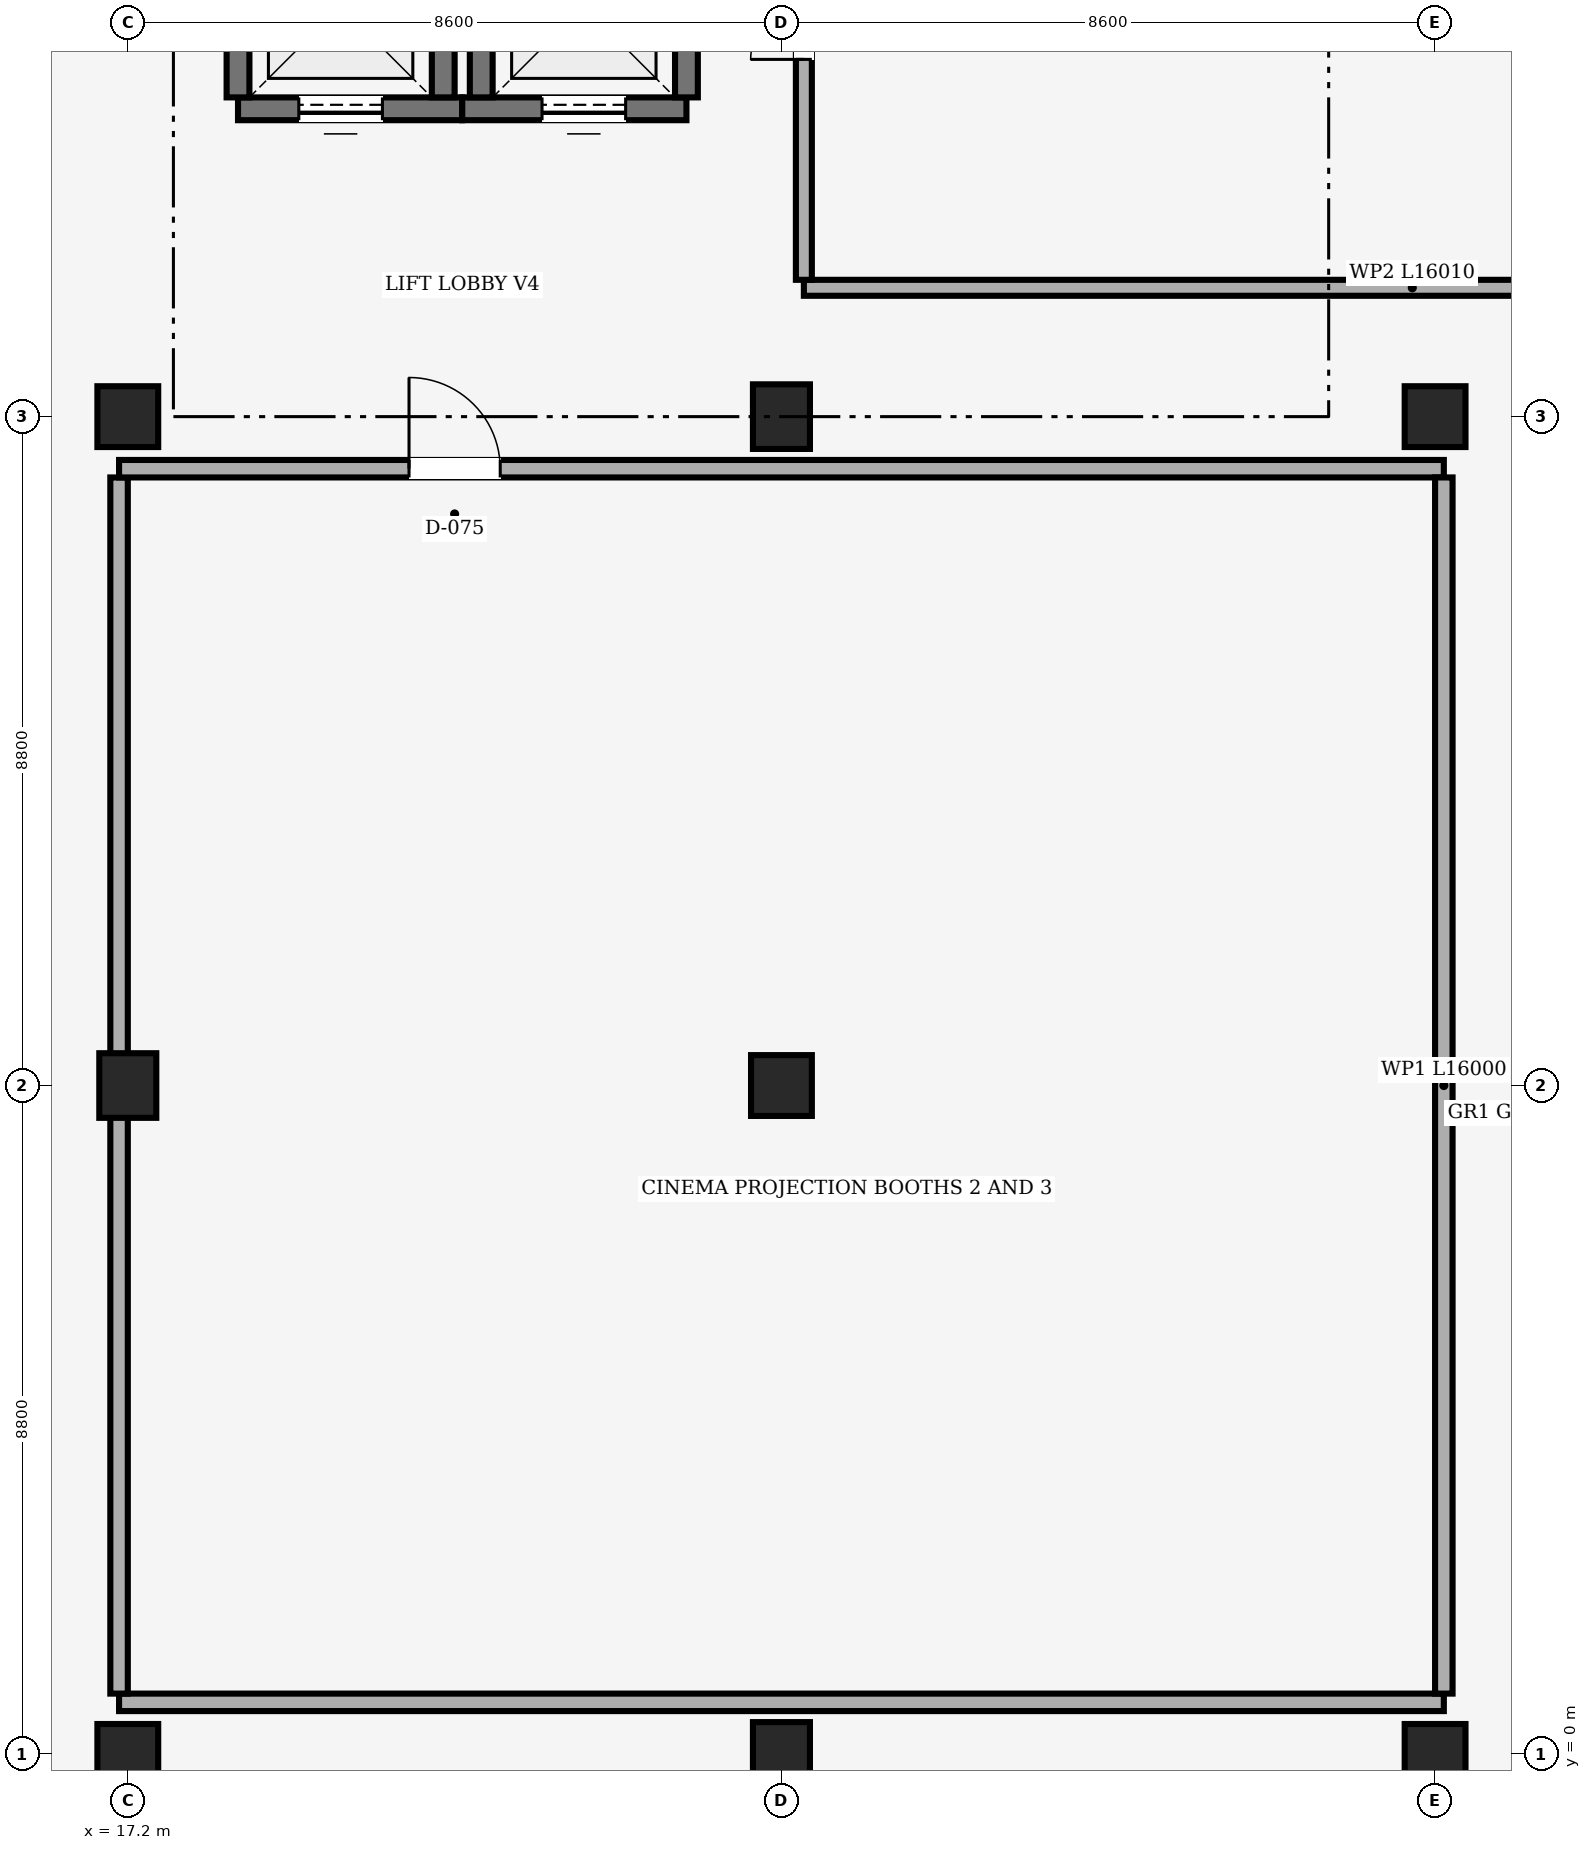
"""IFC4 building model, lengths in metres.
Left out: names, types, materials, properties, quantities, classifications, styles, units other than length and angle.
Written with IfcOpenShell. Run it as: python <this file> out.ifc"""

import sys

from ifc_helpers import new_model, si_unit, direction, frame, frame_2d, origin, origin_2d, place, context, subcontext, project, spatial, rectangle, extrude, element, fill, save


model = new_model("IFC4")
c1 = context("Model", 3, precision=1e-05, world=origin(), true_north=direction((0.0, 1.0)))
c2 = subcontext(c1, "Body", "Model", "MODEL_VIEW")
j1 = project(units=[si_unit("LENGTHUNIT", "METRE"), si_unit("PLANEANGLEUNIT", "RADIAN")], contexts=[c1])
p1 = place(None, origin())
s1 = spatial("IfcSite", under=j1, at=p1, CompositionType="ELEMENT")
p2 = place(p1, origin())
s2 = spatial("IfcBuilding", under=s1, at=p2, CompositionType="ELEMENT")
p3 = place(p2, frame((0.0, 0.0, 8.4)))
s3 = spatial("IfcBuildingStorey", under=s2, at=p3, CompositionType="ELEMENT", Elevation=8.4)
p4 = place(p3, frame((17.2, 0.0, 0.0), z_axis=(0.0, 0.0, 1.0), x_axis=(1.0, 0.0, 0.0)))
e1 = element("IfcColumn", 1, at=p4, inside=s3, PredefinedType="COLUMN", context=c2, shape_type="SweptSolid", body=[
    extrude(rectangle(XDim=0.8, YDim=0.8, at=origin_2d()), origin(), (0.0, 0.0, 1.0), 3.34),
])
p5 = place(p3, frame((17.2, 8.8, 0.0), z_axis=(0.0, 0.0, 1.0), x_axis=(1.0, 0.0, 0.0)))
e2 = element("IfcColumn", 2, at=p5, inside=s3, PredefinedType="COLUMN", context=c2, shape_type="SweptSolid", body=[
    extrude(rectangle(XDim=0.75, YDim=0.85, at=origin_2d()), origin(), (0.0, 0.0, 1.0), 3.34),
])
p6 = place(p3, frame((17.2, 17.6, 0.0), z_axis=(0.0, 0.0, 1.0), x_axis=(1.0, 0.0, 0.0)))
e3 = element("IfcColumn", 3, at=p6, inside=s3, PredefinedType="COLUMN", context=c2, shape_type="SweptSolid", body=[
    extrude(rectangle(XDim=0.8, YDim=0.8, at=origin_2d()), origin(), (0.0, 0.0, 1.0), 3.34),
])
p7 = place(p3, frame((25.8, 0.0, 0.0), z_axis=(0.0, 0.0, 1.0), x_axis=(1.0, 0.0, 0.0)))
e4 = element("IfcColumn", 4, at=p7, inside=s3, PredefinedType="COLUMN", context=c2, shape_type="SweptSolid", body=[
    extrude(rectangle(XDim=0.75, YDim=0.85, at=origin_2d()), origin(), (0.0, 0.0, 1.0), 3.34),
])
p8 = place(p3, frame((25.8, 8.8, 0.0), z_axis=(0.0, 0.0, 1.0), x_axis=(1.0, 0.0, 0.0)))
e5 = element("IfcColumn", 5, at=p8, inside=s3, PredefinedType="COLUMN", context=c2, shape_type="SweptSolid", body=[
    extrude(rectangle(XDim=0.8, YDim=0.8, at=origin_2d()), origin(), (0.0, 0.0, 1.0), 3.34),
])
p9 = place(p3, frame((25.8, 17.6, 0.0), z_axis=(0.0, 0.0, 1.0), x_axis=(1.0, 0.0, 0.0)))
e6 = element("IfcColumn", 6, at=p9, inside=s3, PredefinedType="COLUMN", context=c2, shape_type="SweptSolid", body=[
    extrude(rectangle(XDim=0.75, YDim=0.85, at=origin_2d()), origin(), (0.0, 0.0, 1.0), 3.34),
])
for number, where, z_axis, x_axis in (
    (7, (34.4, 0.0, 0.0), (0.0, 0.0, 1.0), (1.0, 0.0, 0.0)),
    (8, (34.4, 17.6, 0.0), (0.0, 0.0, 1.0), (1.0, 0.0, 0.0)),
):
    element("IfcColumn", number, at=place(p3, frame(where, z_axis=z_axis, x_axis=x_axis)), inside=s3, PredefinedType="COLUMN", context=c2, shape_type="SweptSolid", body=[
        extrude(rectangle(XDim=0.8, YDim=0.8, at=origin_2d()), origin(), (0.0, 0.0, 1.0), 3.34),
    ])
p10 = place(p3, frame((21.6, 21.65, 0.0), z_axis=(0.0, 0.0, 1.0), x_axis=(-1.0, 0.0, 0.0)))
e9 = element("IfcWall", 9, at=p10, inside=s3, PredefinedType="SHEAR", context=c2, shape_type="SweptSolid", body=[
    extrude(rectangle(XDim=2.95, YDim=0.3, at=frame_2d((1.475, 0.0))), origin(), (0.0, 0.0, 1.0), 3.34),
])
p11 = place(p10, frame((1.05, 0.0, 0.0)))
e10 = element("IfcOpeningElement", 10, at=p11, cuts=e9, PredefinedType="OPENING", context=c2, shape_type="SweptSolid", body=[
    extrude(rectangle(XDim=1.1, YDim=2.1, at=frame_2d((0.55, 1.05))), frame((0.0, 0.15, 0.0), z_axis=(0.0, -1.0, 0.0), x_axis=(1.0, 0.0, 0.0)), (0.0, 0.0, 1.0), 0.3),
])
for number, where, z_axis, x_axis in (
    (11, (18.65, 21.8, 0.0), (0.0, 0.0, 1.0), (0.0, 1.0, 0.0)),
    (12, (21.35, 24.2, 0.0), (0.0, 0.0, 1.0), (0.0, -1.0, 0.0)),
):
    element("IfcWall", number, at=place(p3, frame(where, z_axis=z_axis, x_axis=x_axis)), inside=s3, PredefinedType="SHEAR", context=c2, shape_type="SweptSolid", body=[
        extrude(rectangle(XDim=2.4, YDim=0.3, at=frame_2d((1.2, 0.0))), origin(), (0.0, 0.0, 1.0), 3.34),
    ])
p12 = place(p3, frame((24.55, 21.65, 0.0), z_axis=(0.0, 0.0, 1.0), x_axis=(-1.0, 0.0, 0.0)))
e13 = element("IfcWall", 13, at=p12, inside=s3, PredefinedType="SHEAR", context=c2, shape_type="SweptSolid", body=[
    extrude(rectangle(XDim=2.95, YDim=0.3, at=frame_2d((1.475, 0.0))), origin(), (0.0, 0.0, 1.0), 3.34),
])
p13 = place(p12, frame((0.8, 0.0, 0.0)))
e14 = element("IfcOpeningElement", 14, at=p13, cuts=e13, PredefinedType="OPENING", context=c2, shape_type="SweptSolid", body=[
    extrude(rectangle(XDim=1.1, YDim=2.1, at=frame_2d((0.55, 1.05))), frame((0.0, 0.15, 0.0), z_axis=(0.0, -1.0, 0.0), x_axis=(1.0, 0.0, 0.0)), (0.0, 0.0, 1.0), 0.3),
])
for number, where, z_axis, x_axis in (
    (15, (21.85, 21.8, 0.0), (0.0, 0.0, 1.0), (0.0, 1.0, 0.0)),
    (16, (24.55, 24.2, 0.0), (0.0, 0.0, 1.0), (0.0, -1.0, 0.0)),
):
    element("IfcWall", number, at=place(p3, frame(where, z_axis=z_axis, x_axis=x_axis)), inside=s3, PredefinedType="SHEAR", context=c2, shape_type="SweptSolid", body=[
        extrude(rectangle(XDim=2.4, YDim=0.3, at=frame_2d((1.2, 0.0))), origin(), (0.0, 0.0, 1.0), 3.34),
    ])
p14 = place(p3, frame((34.515, 0.685, 0.0), z_axis=(0.0, 0.0, 1.0), x_axis=(-1.0, 0.0, 0.0)))
e17 = element("IfcWall", 17, at=p14, inside=s3, PredefinedType="PARTITIONING", context=c2, shape_type="SweptSolid", body=[
    extrude(rectangle(XDim=17.43, YDim=0.23, at=frame_2d((8.715, 0.0))), origin(), (0.0, 0.0, 1.0), 3.32),
])
p15 = place(p3, frame((17.085, 0.8, 0.0), z_axis=(0.0, 0.0, 1.0), x_axis=(0.0, 1.0, 0.0)))
e18 = element("IfcWall", 18, at=p15, inside=s3, PredefinedType="PARTITIONING", context=c2, shape_type="SweptSolid", body=[
    extrude(rectangle(XDim=16.0, YDim=0.23, at=frame_2d((8.0, 0.0))), origin(), (0.0, 0.0, 1.0), 2.57),
])
p16 = place(p3, frame((17.085, 16.915, 0.0), z_axis=(0.0, 0.0, 1.0), x_axis=(1.0, 0.0, 0.0)))
e19 = element("IfcWall", 19, at=p16, inside=s3, PredefinedType="PARTITIONING", context=c2, shape_type="SweptSolid", body=[
    extrude(rectangle(XDim=17.43, YDim=0.23, at=frame_2d((8.715, 0.0))), origin(), (0.0, 0.0, 1.0), 3.32),
])
p17 = place(p16, frame((3.815, 0.0, 0.0)))
e20 = element("IfcOpeningElement", 20, at=p17, cuts=e19, PredefinedType="OPENING", context=c2, shape_type="SweptSolid", body=[
    extrude(rectangle(XDim=1.2, YDim=2.15, at=frame_2d((0.6, 1.075))), frame((0.0, 0.115, 0.0), z_axis=(0.0, -1.0, 0.0), x_axis=(1.0, 0.0, 0.0)), (0.0, 0.0, 1.0), 0.23),
])
p18 = place(p3, frame((34.515, 16.8, 0.0), z_axis=(0.0, 0.0, 1.0), x_axis=(0.0, -1.0, 0.0)))
e21 = element("IfcWall", 21, at=p18, inside=s3, PredefinedType="PARTITIONING", context=c2, shape_type="SweptSolid", body=[
    extrude(rectangle(XDim=16.0, YDim=0.23, at=frame_2d((8.0, 0.0))), origin(), (0.0, 0.0, 1.0), 2.62),
])
p19 = place(p3, frame((42.105, 19.295, 0.0), z_axis=(0.0, 0.0, 1.0), x_axis=(-1.0, 0.0, 0.0)))
e22 = element("IfcWall", 22, at=p19, inside=s3, PredefinedType="PARTITIONING", context=c2, shape_type="SweptSolid", body=[
    extrude(rectangle(XDim=16.01, YDim=0.21, at=frame_2d((8.005, 0.0))), origin(), (0.0, 0.0, 1.0), 3.32),
])
p20 = place(p3, frame((26.095, 19.4, 0.0), z_axis=(0.0, 0.0, 1.0), x_axis=(0.0, 1.0, 0.0)))
e23 = element("IfcWall", 23, at=p20, inside=s3, PredefinedType="PARTITIONING", context=c2, shape_type="SweptSolid", body=[
    extrude(rectangle(XDim=7.4, YDim=0.21, at=frame_2d((3.7, 0.0))), origin(), (0.0, 0.0, 1.0), 2.67),
])
p21 = place(p20, frame((2.9, 0.0, 0.0)))
e24 = element("IfcOpeningElement", 24, at=p21, cuts=e23, PredefinedType="OPENING", context=c2, shape_type="SweptSolid", body=[
    extrude(rectangle(XDim=1.4, YDim=2.15, at=frame_2d((0.7, 1.075))), frame((0.0, 0.105, 0.0), z_axis=(0.0, -1.0, 0.0), x_axis=(1.0, 0.0, 0.0)), (0.0, 0.0, 1.0), 0.21),
])
p22 = place(p11, origin())
e25 = element("IfcDoor", 25, at=p22, inside=s3, OperationType="SLIDING_TO_LEFT", PredefinedType="DOOR", context=c2, shape_type="SweptSolid", body=[
    extrude(rectangle(XDim=1.1, YDim=2.1, at=frame_2d((0.55, 1.05))), frame((0.0, 0.025, 0.0), z_axis=(0.0, -1.0, 0.0), x_axis=(1.0, 0.0, 0.0)), (0.0, 0.0, 1.0), 0.05),
])
fill(e10, e25)
p23 = place(p13, origin())
e26 = element("IfcDoor", 26, at=p23, inside=s3, OperationType="SLIDING_TO_LEFT", PredefinedType="DOOR", context=c2, shape_type="SweptSolid", body=[
    extrude(rectangle(XDim=1.1, YDim=2.1, at=frame_2d((0.55, 1.05))), frame((0.0, 0.025, 0.0), z_axis=(0.0, -1.0, 0.0), x_axis=(1.0, 0.0, 0.0)), (0.0, 0.0, 1.0), 0.05),
])
fill(e14, e26)
p24 = place(p17, origin())
e27 = element("IfcDoor", 27, at=p24, inside=s3, OperationType="SINGLE_SWING_LEFT", PredefinedType="DOOR", context=c2, shape_type="SweptSolid", body=[
    extrude(rectangle(XDim=1.2, YDim=2.15, at=frame_2d((0.6, 1.075))), frame((0.0, 0.025, 0.0), z_axis=(0.0, -1.0, 0.0), x_axis=(1.0, 0.0, 0.0)), (0.0, 0.0, 1.0), 0.05),
])
fill(e20, e27)
p25 = place(p21, origin())
e28 = element("IfcDoor", 28, at=p25, inside=s3, OperationType="DOUBLE_DOOR_SINGLE_SWING", PredefinedType="DOOR", context=c2, shape_type="SweptSolid", body=[
    extrude(rectangle(XDim=1.4, YDim=2.15, at=frame_2d((0.7, 1.075))), frame((0.0, 0.025, 0.0), z_axis=(0.0, -1.0, 0.0), x_axis=(1.0, 0.0, 0.0)), (0.0, 0.0, 1.0), 0.05),
])
fill(e24, e28)
save(model, sys.argv[1])
